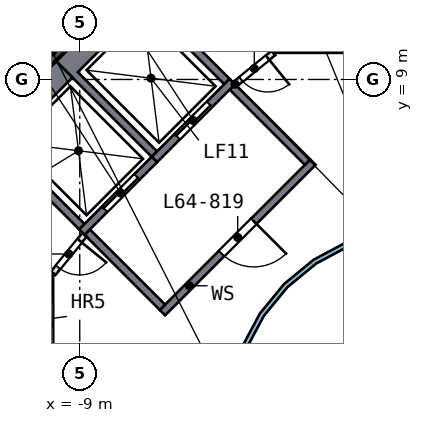
"""IFC4 building model, lengths in metres.
Left out: names, types, materials, properties, quantities, classifications, styles, units other than length and angle.
Written with IfcOpenShell. Run it as: python <this file> out.ifc"""

import sys

from ifc_helpers import new_model, si_unit, direction, frame, frame_2d, origin, place, context, subcontext, project, spatial, polyline, rectangle, outline, extrude, element, fill, save


model = new_model("IFC4")
c1 = context("Model", 3, precision=1e-05, world=origin(), true_north=direction((0.0, 1.0)))
c2 = subcontext(c1, "Body", "Model", "MODEL_VIEW")
j1 = project(units=[si_unit("LENGTHUNIT", "METRE"), si_unit("PLANEANGLEUNIT", "RADIAN")], contexts=[c1])
p1 = place(None, origin())
s1 = spatial("IfcSite", under=j1, at=p1, CompositionType="ELEMENT")
p2 = place(p1, origin())
s2 = spatial("IfcBuilding", under=s1, at=p2, CompositionType="ELEMENT")
p3 = place(p2, frame((0.0, 0.0, 259.5)))
s3 = spatial("IfcBuildingStorey", under=s2, at=p3, CompositionType="ELEMENT", Elevation=259.5)
p4 = place(p3, frame((-5.622, 13.823, 0.0), z_axis=(0.0, 0.0, 1.0), x_axis=(-0.707106781, -0.707106781, 0.0)))
e1 = element("IfcWall", 1, at=p4, inside=s3, PredefinedType="SHEAR", context=c2, shape_type="SweptSolid", body=[
    extrude(rectangle(XDim=11.598, YDim=0.5, at=frame_2d((5.799, 0.0))), origin(), (0.0, 0.0, 1.0), 3.5),
])
p5 = place(p3, frame((-1.2, 9.8, 0.0), z_axis=(0.0, 0.0, 1.0), x_axis=(-1.0, 0.0, 0.0)))
e2 = element("IfcWall", 2, at=p5, inside=s3, PredefinedType="SOLIDWALL", context=c2, shape_type="SweptSolid", body=[
    extrude(rectangle(XDim=2.7, YDim=0.2, at=frame_2d((1.35, 0.0))), origin(), (0.0, 0.0, 1.0), 3.0),
])
p6 = place(p5, frame((0.75, 0.0, 0.0)))
e3 = element("IfcOpeningElement", 3, at=p6, cuts=e2, PredefinedType="OPENING", context=c2, shape_type="SweptSolid", body=[
    extrude(rectangle(XDim=1.2, YDim=2.1, at=frame_2d((0.6, 1.05))), frame((0.0, 0.11, 0.0), z_axis=(0.0, -1.0, 0.0), x_axis=(1.0, 0.0, 0.0)), (0.0, 0.0, 1.0), 0.22),
])
p7 = place(p3, frame((-9.8, 1.2, 0.0), z_axis=(0.0, 0.0, 1.0), x_axis=(0.0, 1.0, 0.0)))
e4 = element("IfcWall", 4, at=p7, inside=s3, PredefinedType="SOLIDWALL", context=c2, shape_type="SweptSolid", body=[
    extrude(rectangle(XDim=2.7, YDim=0.2, at=frame_2d((1.35, 0.0))), origin(), (0.0, 0.0, 1.0), 3.0),
])
p8 = place(p7, frame((0.75, 0.0, 0.0)))
e5 = element("IfcOpeningElement", 5, at=p8, cuts=e4, PredefinedType="OPENING", context=c2, shape_type="SweptSolid", body=[
    extrude(rectangle(XDim=1.2, YDim=2.1, at=frame_2d((0.6, 1.05))), frame((0.0, 0.11, 0.0), z_axis=(0.0, -1.0, 0.0), x_axis=(1.0, 0.0, 0.0)), (0.0, 0.0, 1.0), 0.22),
])
p9 = place(p3, origin())
e6 = element("IfcWall", 6, at=p9, inside=s3, PredefinedType="SOLIDWALL", context=c2, shape_type="SweptSolid", body=[
    extrude(outline(polyline([(-9.617, 9.475), (-7.566, 11.526), (-5.056, 9.016), (-5.197, 8.874), (-7.283, 10.96), (-9.051, 9.192), (-6.965, 7.106), (-7.106, 6.965), (-9.617, 9.475)])), origin(), (0.0, 0.0, 1.0), 3.0),
])
p10 = place(p3, frame((-4.985, 8.945, 0.0), z_axis=(0.0, 0.0, 1.0), x_axis=(-0.707106781, -0.707106781, 0.0)))
e7 = element("IfcWall", 7, at=p10, inside=s3, PredefinedType="SOLIDWALL", context=c2, shape_type="SweptSolid", body=[
    extrude(rectangle(XDim=2.9, YDim=0.2, at=frame_2d((1.45, 0.0))), origin(), (0.0, 0.0, 1.0), 3.0),
])
p11 = place(p10, frame((0.85, 0.0, 0.0)))
e8 = element("IfcOpeningElement", 8, at=p11, cuts=e7, PredefinedType="OPENING", context=c2, shape_type="SweptSolid", body=[
    extrude(rectangle(XDim=1.2, YDim=2.1, at=frame_2d((0.6, 1.05))), frame((0.0, 0.11, 0.0), z_axis=(0.0, -1.0, 0.0), x_axis=(1.0, 0.0, 0.0)), (0.0, 0.0, 1.0), 0.22),
])
p12 = place(p3, origin())
e9 = element("IfcWall", 9, at=p12, inside=s3, PredefinedType="SOLIDWALL", context=c2, shape_type="SweptSolid", body=[
    extrude(outline(polyline([(-11.526, 7.566), (-9.617, 9.475), (-9.192, 9.051), (-10.96, 7.283), (-8.874, 5.197), (-9.016, 5.056), (-11.526, 7.566)])), origin(), (0.0, 0.0, 1.0), 3.0),
])
p13 = place(p3, frame((-7.036, 6.894, 0.0), z_axis=(0.0, 0.0, 1.0), x_axis=(-0.707106781, -0.707106781, 0.0)))
e10 = element("IfcWall", 10, at=p13, inside=s3, PredefinedType="SOLIDWALL", context=c2, shape_type="SweptSolid", body=[
    extrude(rectangle(XDim=2.7, YDim=0.2, at=frame_2d((1.35, 0.0))), origin(), (0.0, 0.0, 1.0), 3.0),
])
p14 = place(p13, frame((0.65, 0.0, 0.0)))
e11 = element("IfcOpeningElement", 11, at=p14, cuts=e10, PredefinedType="OPENING", context=c2, shape_type="SweptSolid", body=[
    extrude(rectangle(XDim=1.2, YDim=2.1, at=frame_2d((0.6, 1.05))), frame((0.0, 0.11, 0.0), z_axis=(0.0, -1.0, 0.0), x_axis=(1.0, 0.0, 0.0)), (0.0, 0.0, 1.0), 0.22),
])
p15 = place(p3, frame((-2.864, 6.823, 0.0), z_axis=(0.0, 0.0, 1.0), x_axis=(-0.707106781, -0.707106781, 0.0)))
e12 = element("IfcWall", 12, at=p15, inside=s3, PredefinedType="SOLIDWALL", context=c2, shape_type="SweptSolid", body=[
    extrude(rectangle(XDim=5.6, YDim=0.2, at=frame_2d((2.8, 0.0))), origin(), (0.0, 0.0, 1.0), 3.0),
])
p16 = place(p15, frame((2.2, 0.0, 0.0)))
e13 = element("IfcOpeningElement", 13, at=p16, cuts=e12, PredefinedType="OPENING", context=c2, shape_type="SweptSolid", body=[
    extrude(rectangle(XDim=1.2, YDim=2.1, at=frame_2d((0.6, 1.05))), frame((0.0, 0.11, 0.0), z_axis=(0.0, -1.0, 0.0), x_axis=(1.0, 0.0, 0.0)), (0.0, 0.0, 1.0), 0.22),
])
for number, where, z_axis, x_axis in (
    (14, (-3.005, 6.823, 0.0), (0.0, 0.0, 1.0), (-0.707, 0.707, 0.0)),
    (15, (-6.823, 3.005, 0.0), (0.0, 0.0, 1.0), (-0.707, 0.707, 0.0)),
):
    element("IfcWall", number, at=place(p3, frame(where, z_axis=z_axis, x_axis=x_axis)), inside=s3, PredefinedType="SOLIDWALL", context=c2, shape_type="SweptSolid", body=[
        extrude(rectangle(XDim=2.8, YDim=0.2, at=frame_2d((1.4, 0.0))), origin(), (0.0, 0.0, 1.0), 3.0),
    ])
p17 = place(p3, frame((-3.9, 9.7, 0.0), z_axis=(0.0, 0.0, 1.0), x_axis=(-0.775559878, -0.631274009, 0.0)))
e16 = element("IfcWall", 16, at=p17, inside=s3, PredefinedType="PARTITIONING", context=c2, shape_type="SweptSolid", body=[
    extrude(rectangle(XDim=1.308, YDim=0.15, at=frame_2d((0.654, 0.0))), origin(), (0.0, 0.0, 1.0), 3.0),
])
p18 = place(p17, frame((0.204, 0.0, 0.0)))
e17 = element("IfcOpeningElement", 17, at=p18, cuts=e16, PredefinedType="OPENING", context=c2, shape_type="SweptSolid", body=[
    extrude(rectangle(XDim=0.9, YDim=2.1, at=frame_2d((0.45, 1.05))), frame((0.0, 0.085, 0.0), z_axis=(0.0, -1.0, 0.0), x_axis=(1.0, 0.0, 0.0)), (0.0, 0.0, 1.0), 0.17),
])
p19 = place(p3, frame((-8.874, 4.914, 0.0), z_axis=(0.0, 0.0, 1.0), x_axis=(-0.631274009, -0.775559878, 0.0)))
e18 = element("IfcWall", 18, at=p19, inside=s3, PredefinedType="PARTITIONING", context=c2, shape_type="SweptSolid", body=[
    extrude(rectangle(XDim=1.308, YDim=0.15, at=frame_2d((0.654, 0.0))), origin(), (0.0, 0.0, 1.0), 3.0),
])
p20 = place(p19, frame((0.204, 0.0, 0.0)))
e19 = element("IfcOpeningElement", 19, at=p20, cuts=e18, PredefinedType="OPENING", context=c2, shape_type="SweptSolid", body=[
    extrude(rectangle(XDim=0.9, YDim=2.1, at=frame_2d((0.45, 1.05))), frame((0.0, 0.085, 0.0), z_axis=(0.0, -1.0, 0.0), x_axis=(1.0, 0.0, 0.0)), (0.0, 0.0, 1.0), 0.17),
])
p21 = place(p3, origin())
e20 = element("IfcWall", 20, at=p21, inside=s3, PredefinedType="SOLIDWALL", context=c2, shape_type="SweptSolid", body=[
    extrude(outline(polyline([(5.021, -0.999), (4.73, -1.959), (4.257, -2.844), (3.62, -3.62), (2.844, -4.257), (1.959, -4.73), (0.999, -5.021), (0.0, -5.12), (-0.999, -5.021), (-1.959, -4.73), (-2.844, -4.257), (-3.62, -3.62), (-4.257, -2.844), (-4.73, -1.959), (-5.021, -0.999), (-5.12, 0.0), (-5.021, 0.999), (-4.73, 1.959), (-4.257, 2.844), (-3.62, 3.62), (-2.844, 4.257), (-1.959, 4.73), (-0.999, 5.021), (0.0, 5.12), (0.999, 5.021), (1.959, 4.73), (2.844, 4.257), (3.62, 3.62), (4.257, 2.844), (4.73, 1.959), (5.021, 0.999), (5.12, 0.0), (5.021, -0.999)]), holes=[polyline([(4.904, 0.976), (4.619, 1.913), (4.157, 2.778), (3.535, 3.535), (2.778, 4.157), (1.913, 4.619), (0.976, 4.904), (0.0, 5.0), (-0.976, 4.904), (-1.913, 4.619), (-2.778, 4.157), (-3.535, 3.535), (-4.157, 2.778), (-4.619, 1.913), (-4.904, 0.976), (-5.0, 0.0), (-4.904, -0.976), (-4.619, -1.913), (-4.157, -2.778), (-3.535, -3.535), (-2.778, -4.157), (-1.913, -4.619), (-0.976, -4.904), (0.0, -5.0), (0.976, -4.904), (1.913, -4.619), (2.778, -4.157), (3.535, -3.535), (4.157, -2.778), (4.619, -1.913), (4.904, -0.976), (5.0, 0.0), (4.904, 0.976)])]), origin(), (0.0, 0.0, 1.0), 3.0),
])
p22 = place(p11, origin())
e21 = element("IfcDoor", 21, at=p22, inside=s3, OperationType="DOUBLE_DOOR_SLIDING", PredefinedType="DOOR", context=c2, shape_type="SweptSolid", body=[
    extrude(rectangle(XDim=1.2, YDim=2.1, at=frame_2d((0.6, 1.05))), frame((0.0, 0.025, 0.0), z_axis=(0.0, -1.0, 0.0), x_axis=(1.0, 0.0, 0.0)), (0.0, 0.0, 1.0), 0.05),
])
fill(e8, e21)
p23 = place(p14, origin())
e22 = element("IfcDoor", 22, at=p23, inside=s3, OperationType="DOUBLE_DOOR_SLIDING", PredefinedType="DOOR", context=c2, shape_type="SweptSolid", body=[
    extrude(rectangle(XDim=1.2, YDim=2.1, at=frame_2d((0.6, 1.05))), frame((0.0, 0.025, 0.0), z_axis=(0.0, -1.0, 0.0), x_axis=(1.0, 0.0, 0.0)), (0.0, 0.0, 1.0), 0.05),
])
fill(e11, e22)
p24 = place(p16, origin())
e23 = element("IfcDoor", 23, at=p24, inside=s3, OperationType="SINGLE_SWING_LEFT", PredefinedType="DOOR", context=c2, shape_type="SweptSolid", body=[
    extrude(rectangle(XDim=1.2, YDim=2.1, at=frame_2d((0.6, 1.05))), frame((0.0, 0.025, 0.0), z_axis=(0.0, -1.0, 0.0), x_axis=(1.0, 0.0, 0.0)), (0.0, 0.0, 1.0), 0.05),
])
fill(e13, e23)
p25 = place(p18, origin())
e24 = element("IfcDoor", 24, at=p25, inside=s3, OperationType="SINGLE_SWING_LEFT", PredefinedType="DOOR", context=c2, shape_type="SweptSolid", body=[
    extrude(rectangle(XDim=0.9, YDim=2.1, at=frame_2d((0.45, 1.05))), frame((0.0, 0.025, 0.0), z_axis=(0.0, -1.0, 0.0), x_axis=(1.0, 0.0, 0.0)), (0.0, 0.0, 1.0), 0.05),
])
fill(e17, e24)
p26 = place(p20, origin())
e25 = element("IfcDoor", 25, at=p26, inside=s3, OperationType="SINGLE_SWING_LEFT", PredefinedType="DOOR", context=c2, shape_type="SweptSolid", body=[
    extrude(rectangle(XDim=0.9, YDim=2.1, at=frame_2d((0.45, 1.05))), frame((0.0, 0.025, 0.0), z_axis=(0.0, -1.0, 0.0), x_axis=(1.0, 0.0, 0.0)), (0.0, 0.0, 1.0), 0.05),
])
fill(e19, e25)
save(model, sys.argv[1])
